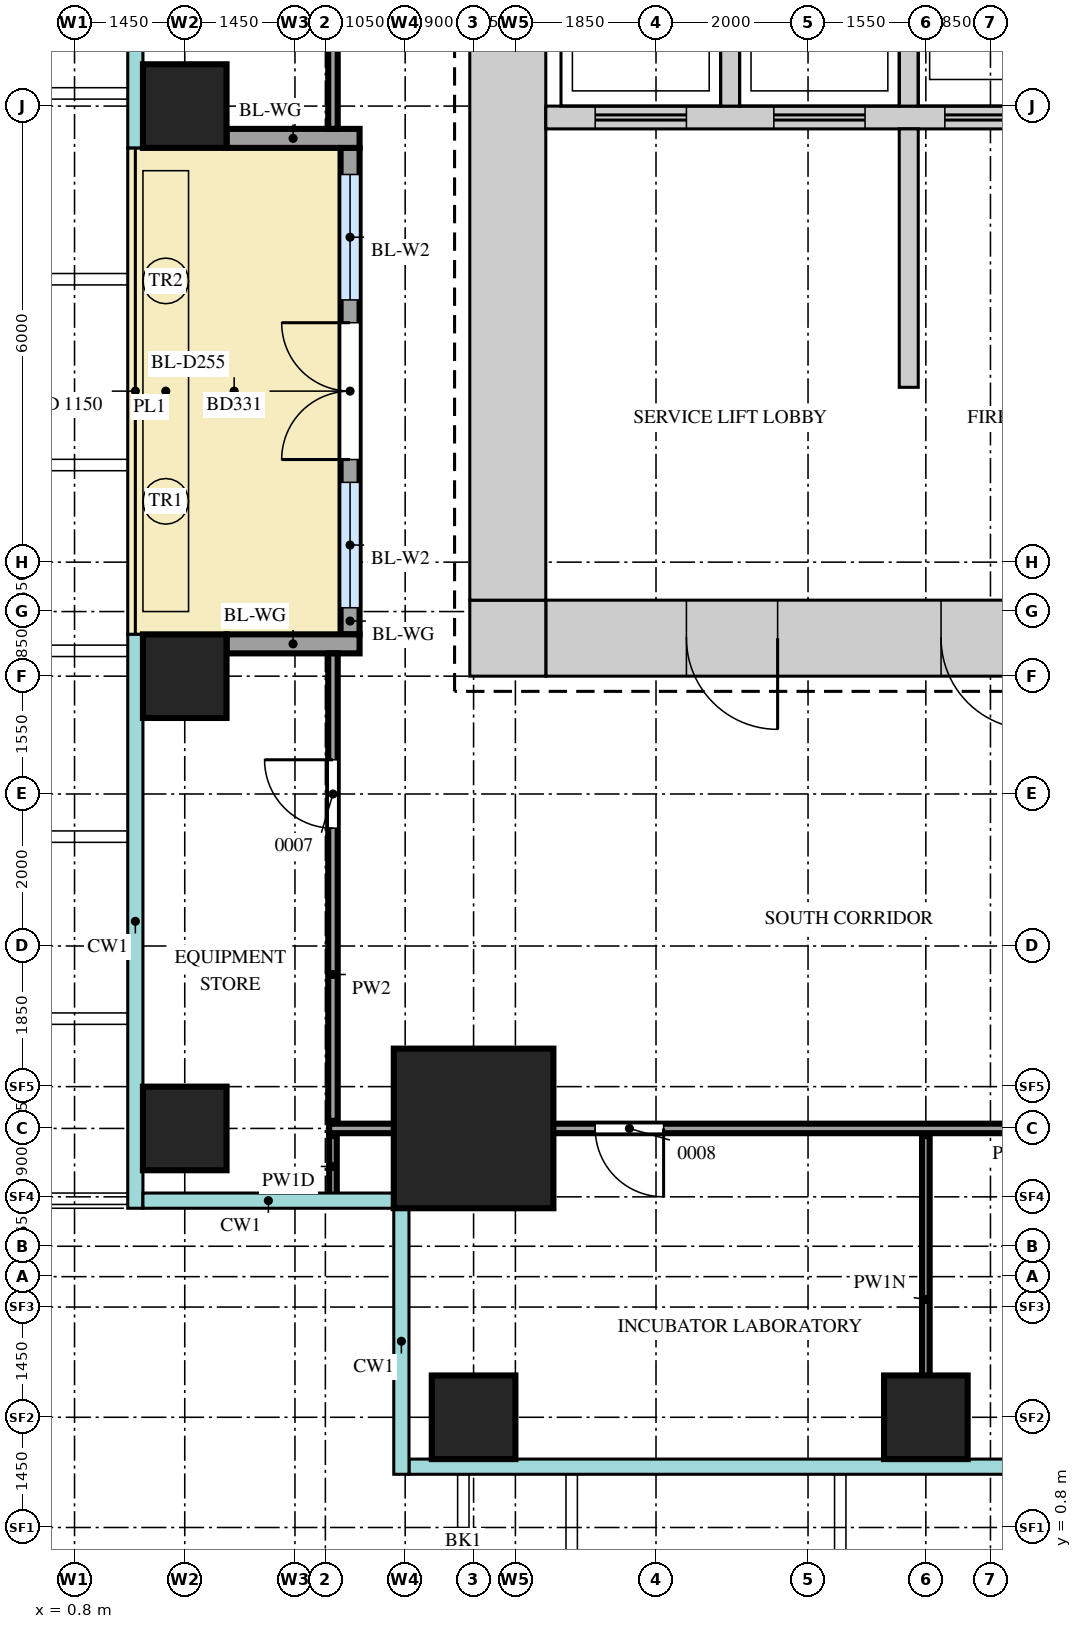
"""IFC4 building model, lengths in metres.
Left out: names, types, materials, properties, quantities, classifications, styles, units other than length and angle.
Written with IfcOpenShell. Run it as: python <this file> out.ifc"""

import sys

from ifc_helpers import new_model, si_unit, direction, frame, frame_2d, origin, origin_2d, place, context, subcontext, project, spatial, rectangle, extrude, source, transform, mapped, element, fill, save


model = new_model("IFC4")
c1 = context("Model", 3, precision=1e-05, world=origin(), true_north=direction((0.0, 1.0)))
c2 = subcontext(c1, "Body", "Model", "MODEL_VIEW")
j1 = project(units=[si_unit("LENGTHUNIT", "METRE"), si_unit("PLANEANGLEUNIT", "RADIAN")], contexts=[c1])
p1 = place(None, origin())
s1 = spatial("IfcSite", under=j1, at=p1, CompositionType="ELEMENT")
p2 = place(p1, origin())
s2 = spatial("IfcBuilding", under=s1, at=p2, CompositionType="ELEMENT")
p3 = place(p2, frame((0.0, 0.0, 154.3)))
s3 = spatial("IfcBuildingStorey", under=s2, at=p3, CompositionType="ELEMENT", Elevation=154.3)
m1 = source(origin(), c2, "Body", "SweptSolid", [
    extrude(rectangle(XDim=6.9, YDim=1.0, at=frame_2d((3.45, 0.0))), origin(), (0.0, 0.0, 1.0), 4.1),
])
p4 = place(p3, frame((7.0, 12.5, 0.0), z_axis=(0.0, 0.0, 1.0), x_axis=(1.0, 0.0, 0.0)))
e1 = element("IfcWall", 1, at=p4, inside=s3, PredefinedType="SHEAR", context=c2, shape_type="MappedRepresentation", body=[
    mapped(m1, transform((0.0, 0.0, 0.0))),
])
m2 = source(origin(), c2, "Body", "SweptSolid", [
    extrude(rectangle(XDim=1.2, YDim=2.1, at=frame_2d((0.6, 1.05))), frame((0.0, 0.51, 0.0), z_axis=(0.0, -1.0, 0.0), x_axis=(1.0, 0.0, 0.0)), (0.0, 0.0, 1.0), 1.02),
])
p5 = place(p4, frame((5.2, 0.0, 0.0)))
e2 = element("IfcOpeningElement", 2, at=p5, cuts=e1, PredefinedType="OPENING", context=c2, shape_type="MappedRepresentation", body=[
    mapped(m2, transform((0.0, 0.0, 0.0))),
])
p6 = place(p4, frame((1.85, 0.0, 0.0)))
e3 = element("IfcOpeningElement", 3, at=p6, cuts=e1, PredefinedType="OPENING", context=c2, shape_type="MappedRepresentation", body=[
    mapped(m2, transform((0.0, 0.0, 0.0))),
])
m3 = source(origin(), c2, "Body", "SweptSolid", [
    extrude(rectangle(XDim=1.0, YDim=1.0, at=frame_2d((0.5, 0.0))), origin(), (0.0, 0.0, 1.0), 4.1),
])
p7 = place(p3, frame((6.0, 12.5, 0.0), z_axis=(0.0, 0.0, 1.0), x_axis=(1.0, 0.0, 0.0)))
e4 = element("IfcWall", 4, at=p7, inside=s3, PredefinedType="SHEAR", context=c2, shape_type="MappedRepresentation", body=[
    mapped(m3, transform((0.0, 0.0, 0.0))),
])
m4 = source(origin(), c2, "Body", "SweptSolid", [
    extrude(rectangle(XDim=28.0, YDim=1.0, at=frame_2d((14.0, 0.0))), origin(), (0.0, 0.0, 1.0), 4.1),
])
p8 = place(p3, frame((6.5, 13.0, 0.0), z_axis=(0.0, 0.0, 1.0), x_axis=(0.0, 1.0, 0.0)))
e5 = element("IfcWall", 5, at=p8, inside=s3, PredefinedType="SHEAR", context=c2, shape_type="MappedRepresentation", body=[
    mapped(m4, transform((0.0, 0.0, 0.0))),
])
m5 = source(origin(), c2, "Body", "SweptSolid", [
    extrude(rectangle(XDim=9.075, YDim=0.3, at=frame_2d((4.538, 0.0))), origin(), (0.0, 0.0, 1.0), 4.1),
])
p9 = place(p3, frame((7.0, 19.35, 0.0), z_axis=(0.0, 0.0, 1.0), x_axis=(1.0, 0.0, 0.0)))
e6 = element("IfcWall", 6, at=p9, inside=s3, PredefinedType="STANDARD", context=c2, shape_type="MappedRepresentation", body=[
    mapped(m5, transform((0.0, 0.0, 0.0))),
])
m6 = source(origin(), c2, "Body", "SweptSolid", [
    extrude(rectangle(XDim=1.2, YDim=2.1, at=frame_2d((0.6, 1.05))), frame((0.0, 0.16, 0.0), z_axis=(0.0, -1.0, 0.0), x_axis=(1.0, 0.0, 0.0)), (0.0, 0.0, 1.0), 0.32),
])
p10 = place(p9, frame((0.65, 0.0, 0.0)))
e7 = element("IfcOpeningElement", 7, at=p10, cuts=e6, PredefinedType="OPENING", context=c2, shape_type="MappedRepresentation", body=[
    mapped(m6, transform((0.0, 0.0, 0.0))),
])
p11 = place(p9, frame((3.0, 0.0, 0.0)))
e8 = element("IfcOpeningElement", 8, at=p11, cuts=e6, PredefinedType="OPENING", context=c2, shape_type="MappedRepresentation", body=[
    mapped(m6, transform((0.0, 0.0, 0.0))),
])
p12 = place(p9, frame((5.25, 0.0, 0.0)))
e9 = element("IfcOpeningElement", 9, at=p12, cuts=e6, PredefinedType="OPENING", context=c2, shape_type="MappedRepresentation", body=[
    mapped(m6, transform((0.0, 0.0, 0.0))),
])
p13 = place(p9, frame((7.4, 0.0, 0.0)))
e10 = element("IfcOpeningElement", 10, at=p13, cuts=e6, PredefinedType="OPENING", context=c2, shape_type="MappedRepresentation", body=[
    mapped(m6, transform((0.0, 0.0, 0.0))),
])
m7 = source(origin(), c2, "Body", "SweptSolid", [
    extrude(rectangle(XDim=3.1, YDim=0.25, at=frame_2d((1.55, 0.0))), origin(), (0.0, 0.0, 1.0), 4.1),
])
for number, where, z_axis, x_axis in (
    (11, (9.425, 19.5, 0.0), (0.0, 0.0, 1.0), (0.0, 1.0, 0.0)),
    (12, (11.775, 19.5, 0.0), (0.0, 0.0, 1.0), (0.0, 1.0, 0.0)),
):
    element("IfcWall", number, at=place(p3, frame(where, z_axis=z_axis, x_axis=x_axis)), inside=s3, PredefinedType="STANDARD", context=c2, shape_type="MappedRepresentation", body=[
        mapped(m7, transform((0.0, 0.0, 0.0))),
    ])
m8 = source(origin(), c2, "Body", "SweptSolid", [
    extrude(rectangle(XDim=3.4, YDim=0.25, at=frame_2d((1.7, 0.0))), origin(), (0.0, 0.0, 1.0), 4.1),
])
p14 = place(p3, frame((11.775, 15.8, 0.0), z_axis=(0.0, 0.0, 1.0), x_axis=(0.0, 1.0, 0.0)))
e13 = element("IfcWall", 13, at=p14, inside=s3, PredefinedType="STANDARD", context=c2, shape_type="MappedRepresentation", body=[
    mapped(m8, transform((0.0, 0.0, 0.0))),
])
m9 = source(origin(), c2, "Body", "SweptSolid", [
    extrude(rectangle(XDim=2.1, YDim=2.1, at=origin_2d()), origin(), (0.0, 0.0, 1.0), 4.4),
])
p15 = place(p3, frame((6.05, 6.05, 0.0), z_axis=(0.0, 0.0, 1.0), x_axis=(1.0, 0.0, 0.0)))
e14 = element("IfcColumn", 14, at=p15, inside=s3, PredefinedType="COLUMN", context=c2, shape_type="MappedRepresentation", body=[
    mapped(m9, transform((0.0, 0.0, 0.0))),
])
m10 = source(origin(), c2, "Body", "SweptSolid", [
    extrude(rectangle(XDim=1.1, YDim=1.1, at=origin_2d()), origin(), (0.0, 0.0, 1.0), 4.4),
])
for number, where, z_axis, x_axis in (
    (15, (6.05, 2.25, 0.0), (0.0, 0.0, 1.0), (1.0, 0.0, 0.0)),
    (16, (12.0, 2.25, 0.0), (0.0, 0.0, 1.0), (1.0, 0.0, 0.0)),
    (17, (2.25, 6.05, 0.0), (0.0, 0.0, 1.0), (1.0, 0.0, 0.0)),
    (18, (2.25, 12.0, 0.0), (0.0, 0.0, 1.0), (1.0, 0.0, 0.0)),
    (19, (2.25, 19.5, 0.0), (0.0, 0.0, 1.0), (1.0, 0.0, 0.0)),
):
    element("IfcColumn", number, at=place(p3, frame(where, z_axis=z_axis, x_axis=x_axis)), inside=s3, PredefinedType="COLUMN", context=c2, shape_type="MappedRepresentation", body=[
        mapped(m10, transform((0.0, 0.0, 0.0))),
    ])
m11 = source(origin(), c2, "Body", "SweptSolid", [
    extrude(rectangle(XDim=6.4, YDim=0.25, at=frame_2d((3.2, 0.0))), origin(), (0.0, 0.0, 1.0), 3.35),
])
p16 = place(p3, frame((4.425, 12.55, 0.0), z_axis=(0.0, 0.0, 1.0), x_axis=(0.0, 1.0, 0.0)))
e20 = element("IfcWall", 20, at=p16, inside=s3, PredefinedType="SOLIDWALL", context=c2, shape_type="MappedRepresentation", body=[
    mapped(m11, transform((0.0, 0.0, 0.0))),
])
m12 = source(origin(), c2, "Body", "SweptSolid", [
    extrude(rectangle(XDim=1.65, YDim=2.4, at=frame_2d((0.825, 1.2))), frame((0.0, 0.135, 0.0), z_axis=(0.0, -1.0, 0.0), x_axis=(1.0, 0.0, 0.0)), (0.0, 0.0, 1.0), 0.27),
])
p17 = place(p16, frame((0.35, 0.0, 0.0)))
e21 = element("IfcOpeningElement", 21, at=p17, cuts=e20, PredefinedType="OPENING", context=c2, shape_type="MappedRepresentation", body=[
    mapped(m12, transform((0.0, 0.0, 0.0))),
])
p18 = place(p16, frame((4.4, 0.0, 0.0)))
e22 = element("IfcOpeningElement", 22, at=p18, cuts=e20, PredefinedType="OPENING", context=c2, shape_type="MappedRepresentation", body=[
    mapped(m12, transform((0.0, 0.0, 0.0))),
])
m13 = source(origin(), c2, "Body", "SweptSolid", [
    extrude(rectangle(XDim=1.8, YDim=2.4, at=frame_2d((0.9, 1.2))), frame((0.0, 0.135, 0.0), z_axis=(0.0, -1.0, 0.0), x_axis=(1.0, 0.0, 0.0)), (0.0, 0.0, 1.0), 0.27),
])
p19 = place(p16, frame((2.3, 0.0, 0.0)))
e23 = element("IfcOpeningElement", 23, at=p19, cuts=e20, PredefinedType="OPENING", context=c2, shape_type="MappedRepresentation", body=[
    mapped(m13, transform((0.0, 0.0, 0.0))),
])
m14 = source(origin(), c2, "Body", "SweptSolid", [
    extrude(rectangle(XDim=1.75, YDim=0.25, at=frame_2d((0.875, 0.0))), origin(), (0.0, 0.0, 1.0), 3.35),
])
for number, where, z_axis, x_axis in (
    (24, (2.8, 12.425, 0.0), (0.0, 0.0, 1.0), (1.0, 0.0, 0.0)),
    (25, (2.8, 19.075, 0.0), (0.0, 0.0, 1.0), (1.0, 0.0, 0.0)),
):
    element("IfcWall", number, at=place(p3, frame(where, z_axis=z_axis, x_axis=x_axis)), inside=s3, PredefinedType="SOLIDWALL", context=c2, shape_type="MappedRepresentation", body=[
        mapped(m14, transform((0.0, 0.0, 0.0))),
    ])
m15 = source(origin(), c2, "Body", "SweptSolid", [
    extrude(rectangle(XDim=4.3, YDim=0.1, at=frame_2d((2.15, 0.0))), origin(), (0.0, 0.0, 1.0), 3.5),
])
p20 = place(p3, frame((12.0, 1.65, 0.0), z_axis=(0.0, 0.0, 1.0), x_axis=(0.0, 1.0, 0.0)))
e26 = element("IfcWall", 26, at=p20, inside=s3, PredefinedType="PARTITIONING", context=c2, shape_type="MappedRepresentation", body=[
    mapped(m15, transform((0.0, 0.0, 0.0))),
])
m16 = source(origin(), c2, "Body", "SweptSolid", [
    extrude(rectangle(XDim=0.8, YDim=0.1, at=frame_2d((0.4, 0.0))), origin(), (0.0, 0.0, 1.0), 4.2),
])
p21 = place(p3, frame((4.2, 5.15, 0.0), z_axis=(0.0, 0.0, 1.0), x_axis=(0.0, 1.0, 0.0)))
e27 = element("IfcWall", 27, at=p21, inside=s3, PredefinedType="PARTITIONING", context=c2, shape_type="MappedRepresentation", body=[
    mapped(m16, transform((0.0, 0.0, 0.0))),
])
m17 = source(origin(), c2, "Body", "SweptSolid", [
    extrude(rectangle(XDim=22.3, YDim=0.125, at=frame_2d((11.15, 0.0))), origin(), (0.0, 0.0, 1.0), 3.4),
])
p22 = place(p3, frame((4.15, 6.05, 0.0), z_axis=(0.0, 0.0, 1.0), x_axis=(1.0, 0.0, 0.0)))
e28 = element("IfcWall", 28, at=p22, inside=s3, PredefinedType="PARTITIONING", context=c2, shape_type="MappedRepresentation", body=[
    mapped(m17, transform((0.0, 0.0, 0.0))),
])
m18 = source(origin(), c2, "Body", "SweptSolid", [
    extrude(rectangle(XDim=0.9, YDim=2.1, at=frame_2d((0.45, 1.05))), frame((0.0, 0.073, 0.0), z_axis=(0.0, -1.0, 0.0), x_axis=(1.0, 0.0, 0.0)), (0.0, 0.0, 1.0), 0.145),
])
p23 = place(p22, frame((3.5, 0.0, 0.0)))
e29 = element("IfcOpeningElement", 29, at=p23, cuts=e28, PredefinedType="OPENING", context=c2, shape_type="MappedRepresentation", body=[
    mapped(m18, transform((0.0, 0.0, 0.0))),
])
p24 = place(p22, frame((14.6, 0.0, 0.0)))
e30 = element("IfcOpeningElement", 30, at=p24, cuts=e28, PredefinedType="OPENING", context=c2, shape_type="MappedRepresentation", body=[
    mapped(m18, transform((0.0, 0.0, 0.0))),
])
m19 = source(origin(), c2, "Body", "SweptSolid", [
    extrude(rectangle(XDim=6.15, YDim=0.125, at=frame_2d((3.075, 0.0))), origin(), (0.0, 0.0, 1.0), 4.2),
])
p25 = place(p3, frame((4.2, 6.15, 0.0), z_axis=(0.0, 0.0, 1.0), x_axis=(0.0, 1.0, 0.0)))
e31 = element("IfcWall", 31, at=p25, inside=s3, PredefinedType="PARTITIONING", context=c2, shape_type="MappedRepresentation", body=[
    mapped(m19, transform((0.0, 0.0, 0.0))),
])
p26 = place(p25, frame((3.85, 0.0, 0.0)))
e32 = element("IfcOpeningElement", 32, at=p26, cuts=e31, PredefinedType="OPENING", context=c2, shape_type="MappedRepresentation", body=[
    mapped(m18, transform((0.0, 0.0, 0.0))),
])
m20 = source(origin(), c2, "Body", "SweptSolid", [
    extrude(rectangle(XDim=28.75, YDim=0.125, at=frame_2d((14.375, 0.0))), origin(), (0.0, 0.0, 1.0), 4.2),
])
p27 = place(p3, frame((4.2, 19.2, 0.0), z_axis=(0.0, 0.0, 1.0), x_axis=(0.0, 1.0, 0.0)))
e33 = element("IfcWall", 33, at=p27, inside=s3, PredefinedType="PARTITIONING", context=c2, shape_type="MappedRepresentation", body=[
    mapped(m20, transform((0.0, 0.0, 0.0))),
])
p28 = place(p27, frame((5.95, 0.0, 0.0)))
e34 = element("IfcOpeningElement", 34, at=p28, cuts=e33, PredefinedType="OPENING", context=c2, shape_type="MappedRepresentation", body=[
    mapped(m18, transform((0.0, 0.0, 0.0))),
])
p29 = place(p27, frame((20.25, 0.0, 0.0)))
e35 = element("IfcOpeningElement", 35, at=p29, cuts=e33, PredefinedType="OPENING", context=c2, shape_type="MappedRepresentation", body=[
    mapped(m18, transform((0.0, 0.0, 0.0))),
])
m21 = source(origin(), c2, "Body", "SweptSolid", [
    extrude(rectangle(XDim=1.65, YDim=2.4, at=frame_2d((0.825, 1.2))), frame((0.0, 0.03, 0.0), z_axis=(0.0, -1.0, 0.0), x_axis=(1.0, 0.0, 0.0)), (0.0, 0.0, 1.0), 0.06),
])
p30 = place(p17, origin())
e36 = element("IfcWindow", 36, at=p30, inside=s3, PartitioningType="SINGLE_PANEL", PredefinedType="WINDOW", context=c2, shape_type="MappedRepresentation", body=[
    mapped(m21, transform((0.0, 0.0, 0.0))),
])
fill(e21, e36)
p31 = place(p18, origin())
e37 = element("IfcWindow", 37, at=p31, inside=s3, PartitioningType="SINGLE_PANEL", PredefinedType="WINDOW", context=c2, shape_type="MappedRepresentation", body=[
    mapped(m21, transform((0.0, 0.0, 0.0))),
])
fill(e22, e37)
m22 = source(origin(), c2, "Body", "SweptSolid", [
    extrude(rectangle(XDim=1.8, YDim=2.4, at=frame_2d((0.9, 1.2))), frame((0.0, 0.025, 0.0), z_axis=(0.0, -1.0, 0.0), x_axis=(1.0, 0.0, 0.0)), (0.0, 0.0, 1.0), 0.05),
])
p32 = place(p19, origin())
e38 = element("IfcDoor", 38, at=p32, inside=s3, OperationType="DOUBLE_DOOR_DOUBLE_SWING", PredefinedType="DOOR", context=c2, shape_type="MappedRepresentation", body=[
    mapped(m22, transform((0.0, 0.0, 0.0))),
])
fill(e23, e38)
m23 = source(origin(), c2, "Body", "SweptSolid", [
    extrude(rectangle(XDim=1.2, YDim=2.1, at=frame_2d((0.6, 1.05))), frame((0.0, 0.45, 0.0), z_axis=(0.0, -1.0, 0.0), x_axis=(1.0, 0.0, 0.0)), (0.0, 0.0, 1.0), 0.9),
])
p33 = place(p5, origin())
e39 = element("IfcDoor", 39, at=p33, inside=s3, OperationType="SINGLE_SWING_RIGHT", PredefinedType="DOOR", context=c2, shape_type="MappedRepresentation", body=[
    mapped(m23, transform((0.0, 0.0, 0.0))),
])
fill(e2, e39)
p34 = place(p6, origin())
e40 = element("IfcDoor", 40, at=p34, inside=s3, OperationType="SINGLE_SWING_RIGHT", PredefinedType="DOOR", context=c2, shape_type="MappedRepresentation", body=[
    mapped(m23, transform((0.0, 0.0, 0.0))),
])
fill(e3, e40)
m24 = source(origin(), c2, "Body", "SweptSolid", [
    extrude(rectangle(XDim=0.9, YDim=2.1, at=frame_2d((0.45, 1.05))), frame((0.0, 0.025, 0.0), z_axis=(0.0, -1.0, 0.0), x_axis=(1.0, 0.0, 0.0)), (0.0, 0.0, 1.0), 0.05),
])
p35 = place(p23, origin())
e41 = element("IfcDoor", 41, at=p35, inside=s3, OperationType="SINGLE_SWING_RIGHT", PredefinedType="DOOR", context=c2, shape_type="MappedRepresentation", body=[
    mapped(m24, transform((0.0, 0.0, 0.0))),
])
fill(e29, e41)
p36 = place(p26, origin())
e42 = element("IfcDoor", 42, at=p36, inside=s3, OperationType="SINGLE_SWING_LEFT", PredefinedType="DOOR", context=c2, shape_type="MappedRepresentation", body=[
    mapped(m24, transform((0.0, 0.0, 0.0))),
])
fill(e32, e42)
m25 = source(origin(), c2, "Body", "SweptSolid", [
    extrude(rectangle(XDim=1.2, YDim=2.1, at=frame_2d((0.6, 1.05))), frame((0.0, 0.025, 0.0), z_axis=(0.0, -1.0, 0.0), x_axis=(1.0, 0.0, 0.0)), (0.0, 0.0, 1.0), 0.05),
])
p37 = place(p10, origin())
e43 = element("IfcDoor", 43, at=p37, inside=s3, OperationType="DOUBLE_DOOR_SLIDING", PredefinedType="DOOR", context=c2, shape_type="MappedRepresentation", body=[
    mapped(m25, transform((0.0, 0.0, 0.0))),
])
fill(e7, e43)
p38 = place(p11, origin())
e44 = element("IfcDoor", 44, at=p38, inside=s3, OperationType="DOUBLE_DOOR_SLIDING", PredefinedType="DOOR", context=c2, shape_type="MappedRepresentation", body=[
    mapped(m25, transform((0.0, 0.0, 0.0))),
])
fill(e8, e44)
p39 = place(p12, origin())
e45 = element("IfcDoor", 45, at=p39, inside=s3, OperationType="DOUBLE_DOOR_SLIDING", PredefinedType="DOOR", context=c2, shape_type="MappedRepresentation", body=[
    mapped(m25, transform((0.0, 0.0, 0.0))),
])
fill(e9, e45)
save(model, sys.argv[1])
